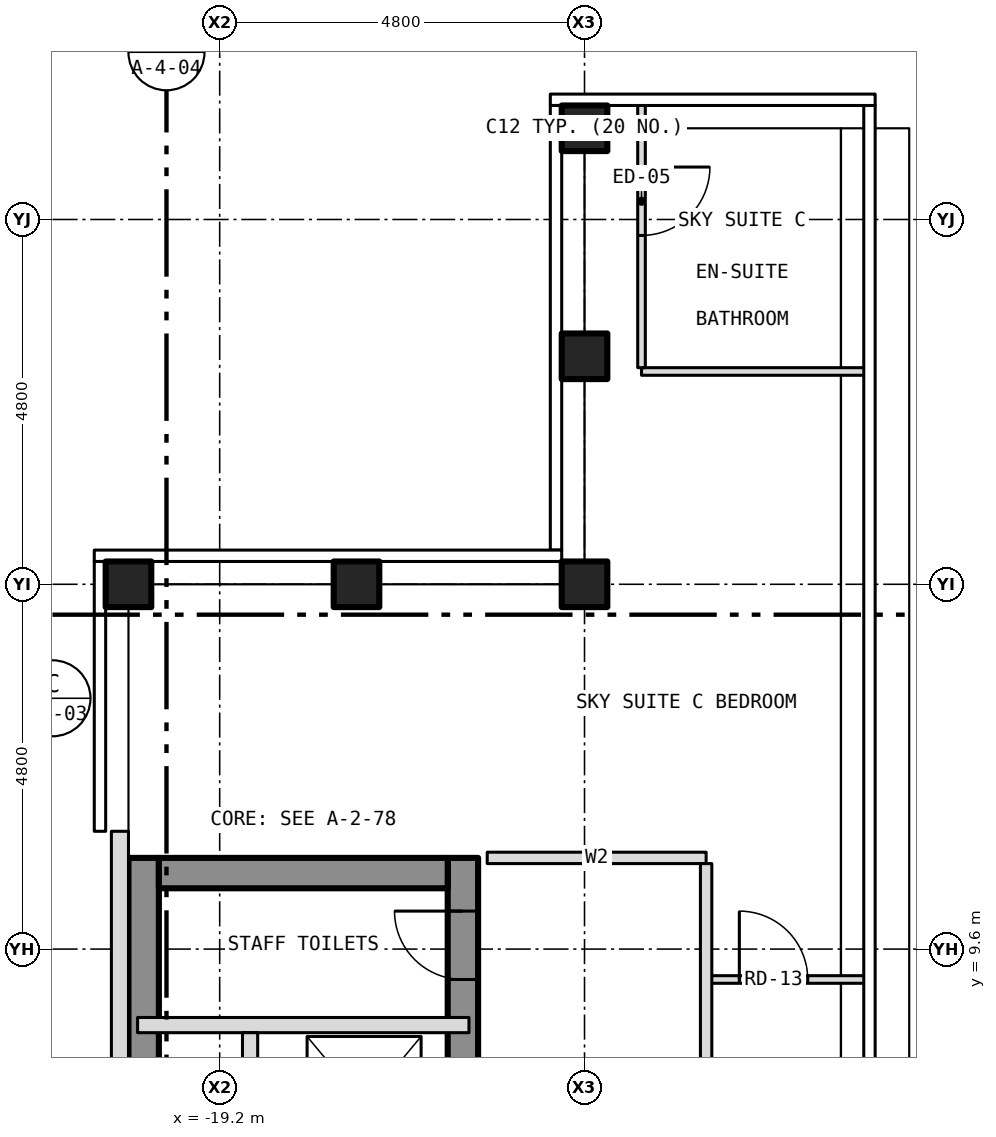
"""IFC4 building model, lengths in metres.
Left out: names, types, materials, properties, quantities, classifications, styles, units other than length and angle.
Written with IfcOpenShell. Run it as: python <this file> out.ifc"""

import sys

from ifc_helpers import new_model, si_unit, direction, frame, frame_2d, origin, origin_2d, place, context, subcontext, project, spatial, rectangle, hollow_rectangle, extrude, element, fill, save


model = new_model("IFC4")
c1 = context("Model", 3, precision=1e-05, world=origin(), true_north=direction((0.0, 1.0)))
c2 = subcontext(c1, "Body", "Model", "MODEL_VIEW")
j1 = project(units=[si_unit("LENGTHUNIT", "METRE"), si_unit("PLANEANGLEUNIT", "RADIAN")], contexts=[c1])
p1 = place(None, origin())
s1 = spatial("IfcSite", under=j1, at=p1, CompositionType="ELEMENT")
p2 = place(p1, origin())
s2 = spatial("IfcBuilding", under=s1, at=p2, CompositionType="ELEMENT")
p3 = place(p2, frame((0.0, 0.0, 283.0)))
s3 = spatial("IfcBuildingStorey", under=s2, at=p3, CompositionType="ELEMENT", Elevation=283.0)
for number, where, z_axis, x_axis in (
    (1, (-14.4, 20.4, -0.15), (0.0, 0.0, 1.0), (1.0, 0.0, 0.0)),
    (2, (-20.4, 14.4, -0.15), (0.0, 0.0, 1.0), (1.0, 0.0, 0.0)),
    (3, (-14.4, 14.4, -0.15), (0.0, 0.0, 1.0), (1.0, 0.0, 0.0)),
    (4, (-14.4, 17.4, -0.15), (0.0, 0.0, 1.0), (1.0, 0.0, 0.0)),
    (5, (-17.4, 14.4, -0.15), (0.0, 0.0, 1.0), (1.0, 0.0, 0.0)),
):
    element("IfcColumn", number, at=place(p3, frame(where, z_axis=z_axis, x_axis=x_axis)), inside=s3, PredefinedType="COLUMN", context=c2, shape_type="SweptSolid", body=[
        extrude(hollow_rectangle(XDim=0.6, YDim=0.6, WallThickness=0.03, at=origin_2d()), origin(), (0.0, 0.0, 1.0), 3.5),
    ])
p4 = place(p3, frame((-16.0, -10.8, 0.0), z_axis=(0.0, 0.0, 1.0), x_axis=(0.0, 1.0, 0.0)))
e6 = element("IfcWall", 6, at=p4, inside=s3, PredefinedType="SHEAR", context=c2, shape_type="SweptSolid", body=[
    extrude(rectangle(XDim=21.6, YDim=0.4, at=frame_2d((10.8, 0.0))), origin(), (0.0, 0.0, 1.0), 3.25),
])
p5 = place(p4, frame((9.4, 0.0, 0.0)))
e7 = element("IfcOpeningElement", 7, at=p5, cuts=e6, PredefinedType="OPENING", context=c2, shape_type="SweptSolid", body=[
    extrude(rectangle(XDim=1.1, YDim=2.1, at=frame_2d((0.55, 1.05))), frame((0.0, 0.212, 0.0), z_axis=(0.0, -1.0, 0.0), x_axis=(1.0, 0.0, 0.0)), (0.0, 0.0, 1.0), 0.424),
])
p6 = place(p4, frame((11.5, 0.0, 0.0)))
e8 = element("IfcOpeningElement", 8, at=p6, cuts=e6, PredefinedType="OPENING", context=c2, shape_type="SweptSolid", body=[
    extrude(rectangle(XDim=1.1, YDim=2.1, at=frame_2d((0.55, 1.05))), frame((0.0, 0.212, 0.0), z_axis=(0.0, -1.0, 0.0), x_axis=(1.0, 0.0, 0.0)), (0.0, 0.0, 1.0), 0.424),
])
p7 = place(p4, frame((13.6, 0.0, 0.0)))
e9 = element("IfcOpeningElement", 9, at=p7, cuts=e6, PredefinedType="OPENING", context=c2, shape_type="SweptSolid", body=[
    extrude(rectangle(XDim=1.1, YDim=2.1, at=frame_2d((0.55, 1.05))), frame((0.0, 0.212, 0.0), z_axis=(0.0, -1.0, 0.0), x_axis=(1.0, 0.0, 0.0)), (0.0, 0.0, 1.0), 0.424),
])
p8 = place(p4, frame((15.7, 0.0, 0.0)))
e10 = element("IfcOpeningElement", 10, at=p8, cuts=e6, PredefinedType="OPENING", context=c2, shape_type="SweptSolid", body=[
    extrude(rectangle(XDim=1.1, YDim=2.1, at=frame_2d((0.55, 1.05))), frame((0.0, 0.212, 0.0), z_axis=(0.0, -1.0, 0.0), x_axis=(1.0, 0.0, 0.0)), (0.0, 0.0, 1.0), 0.424),
])
p9 = place(p4, frame((17.8, 0.0, 0.0)))
e11 = element("IfcOpeningElement", 11, at=p9, cuts=e6, PredefinedType="OPENING", context=c2, shape_type="SweptSolid", body=[
    extrude(rectangle(XDim=1.1, YDim=2.1, at=frame_2d((0.55, 1.05))), frame((0.0, 0.212, 0.0), z_axis=(0.0, -1.0, 0.0), x_axis=(1.0, 0.0, 0.0)), (0.0, 0.0, 1.0), 0.424),
])
p10 = place(p4, frame((0.458, 0.0, 0.0)))
e12 = element("IfcOpeningElement", 12, at=p10, cuts=e6, PredefinedType="OPENING", context=c2, shape_type="SweptSolid", body=[
    extrude(rectangle(XDim=1.1, YDim=2.1, at=frame_2d((0.55, 1.05))), frame((0.0, 0.212, 0.0), z_axis=(0.0, -1.0, 0.0), x_axis=(1.0, 0.0, 0.0)), (0.0, 0.0, 1.0), 0.424),
])
p11 = place(p4, frame((7.5, 0.0, 0.0)))
e13 = element("IfcOpeningElement", 13, at=p11, cuts=e6, PredefinedType="OPENING", context=c2, shape_type="SweptSolid", body=[
    extrude(rectangle(XDim=1.1, YDim=2.1, at=frame_2d((0.55, 1.05))), frame((0.0, 0.212, 0.0), z_axis=(0.0, -1.0, 0.0), x_axis=(1.0, 0.0, 0.0)), (0.0, 0.0, 1.0), 0.424),
])
p12 = place(p4, frame((20.0, 0.0, 0.0)))
e14 = element("IfcOpeningElement", 14, at=p12, cuts=e6, PredefinedType="OPENING", context=c2, shape_type="SweptSolid", body=[
    extrude(rectangle(XDim=0.9, YDim=2.1, at=frame_2d((0.45, 1.05))), frame((0.0, 0.212, 0.0), z_axis=(0.0, -1.0, 0.0), x_axis=(1.0, 0.0, 0.0)), (0.0, 0.0, 1.0), 0.424),
])
p13 = place(p3, frame((-20.2, -10.8, 0.0), z_axis=(0.0, 0.0, 1.0), x_axis=(0.0, 1.0, 0.0)))
e15 = element("IfcWall", 15, at=p13, inside=s3, PredefinedType="SHEAR", context=c2, shape_type="SweptSolid", body=[
    extrude(rectangle(XDim=21.6, YDim=0.4, at=frame_2d((10.8, 0.0))), origin(), (0.0, 0.0, 1.0), 3.25),
])
p14 = place(p3, frame((-20.0, 10.6, 0.0), z_axis=(0.0, 0.0, 1.0), x_axis=(1.0, 0.0, 0.0)))
e16 = element("IfcWall", 16, at=p14, inside=s3, PredefinedType="SHEAR", context=c2, shape_type="SweptSolid", body=[
    extrude(rectangle(XDim=3.8, YDim=0.4, at=frame_2d((1.9, 0.0))), origin(), (0.0, 0.0, 1.0), 3.25),
])
p15 = place(p3, frame((-20.512, 11.15, 0.0), z_axis=(0.0, 0.0, 1.0), x_axis=(0.0, -1.0, 0.0)))
e17 = element("IfcWall", 17, at=p15, inside=s3, PredefinedType="SOLIDWALL", context=c2, shape_type="SweptSolid", body=[
    extrude(rectangle(XDim=22.3, YDim=0.225, at=frame_2d((11.15, 0.0))), origin(), (0.0, 0.0, 1.0), 3.5),
])
p16 = place(p15, frame((18.4, 0.0, 1.0)))
e18 = element("IfcOpeningElement", 18, at=p16, cuts=e17, PredefinedType="OPENING", context=c2, shape_type="SweptSolid", body=[
    extrude(rectangle(XDim=0.6, YDim=1.5, at=frame_2d((0.3, 0.75))), frame((0.0, 0.125, 0.0), z_axis=(0.0, -1.0, 0.0), x_axis=(1.0, 0.0, 0.0)), (0.0, 0.0, 1.0), 0.249),
])
p17 = place(p3, frame((-20.28, 8.6, 0.0), z_axis=(0.0, 0.0, 1.0), x_axis=(1.0, 0.0, 0.0)))
e19 = element("IfcWall", 19, at=p17, inside=s3, PredefinedType="PARTITIONING", context=c2, shape_type="SweptSolid", body=[
    extrude(rectangle(XDim=4.36, YDim=0.2, at=frame_2d((2.18, 0.0))), origin(), (0.0, 0.0, 1.0), 3.25),
])
p18 = place(p3, frame((-12.8, 9.2, 0.0), z_axis=(0.0, 0.0, 1.0), x_axis=(1.0, 0.0, 0.0)))
e20 = element("IfcWall", 20, at=p18, inside=s3, PredefinedType="PARTITIONING", context=c2, shape_type="SweptSolid", body=[
    extrude(rectangle(XDim=2.104, YDim=0.1, at=frame_2d((1.052, 0.0))), origin(), (0.0, 0.0, 1.0), 3.35),
])
p19 = place(p18, frame((0.437, 0.0, 0.0)))
e21 = element("IfcOpeningElement", 21, at=p19, cuts=e20, PredefinedType="OPENING", context=c2, shape_type="SweptSolid", body=[
    extrude(rectangle(XDim=0.9, YDim=2.1, at=frame_2d((0.45, 1.05))), frame((0.0, 0.062, 0.0), z_axis=(0.0, -1.0, 0.0), x_axis=(1.0, 0.0, 0.0)), (0.0, 0.0, 1.0), 0.124),
])
p20 = place(p3, frame((-15.68, 10.8, 0.0), z_axis=(0.0, 0.0, 1.0), x_axis=(1.0, 0.0, 0.0)))
e22 = element("IfcWall", 22, at=p20, inside=s3, PredefinedType="PARTITIONING", context=c2, shape_type="SweptSolid", body=[
    extrude(rectangle(XDim=2.88, YDim=0.15, at=frame_2d((1.44, 0.0))), origin(), (0.0, 0.0, 1.0), 3.35),
])
p21 = place(p3, frame((-13.65, 17.2, 0.0), z_axis=(0.0, 0.0, 1.0), x_axis=(1.0, 0.0, 0.0)))
e23 = element("IfcWall", 23, at=p21, inside=s3, PredefinedType="PARTITIONING", context=c2, shape_type="SweptSolid", body=[
    extrude(rectangle(XDim=2.954, YDim=0.1, at=frame_2d((1.477, 0.0))), origin(), (0.0, 0.0, 1.0), 3.35),
])
p22 = place(p3, frame((-18.8, -1.8, 0.0), z_axis=(0.0, 0.0, 1.0), x_axis=(0.0, 1.0, 0.0)))
e24 = element("IfcWall", 24, at=p22, inside=s3, PredefinedType="PARTITIONING", context=c2, shape_type="SweptSolid", body=[
    extrude(rectangle(XDim=10.3, YDim=0.2, at=frame_2d((5.15, 0.0))), origin(), (0.0, 0.0, 1.0), 3.25),
])
p23 = place(p3, frame((-13.65, 17.25, 0.0), z_axis=(0.0, 0.0, 1.0), x_axis=(0.0, 1.0, 0.0)))
e25 = element("IfcWall", 25, at=p23, inside=s3, PredefinedType="PARTITIONING", context=c2, shape_type="SweptSolid", body=[
    extrude(rectangle(XDim=3.48, YDim=0.1, at=frame_2d((1.74, 0.0))), origin(), (0.0, 0.0, 1.0), 3.35),
])
p24 = place(p23, frame((1.74, 0.0, 0.0)))
e26 = element("IfcOpeningElement", 26, at=p24, cuts=e25, PredefinedType="OPENING", context=c2, shape_type="SweptSolid", body=[
    extrude(rectangle(XDim=0.9, YDim=2.1, at=frame_2d((0.45, 1.05))), frame((0.0, 0.062, 0.0), z_axis=(0.0, -1.0, 0.0), x_axis=(1.0, 0.0, 0.0)), (0.0, 0.0, 1.0), 0.124),
])
p25 = place(p3, frame((-12.8, 2.4, 0.0), z_axis=(0.0, 0.0, 1.0), x_axis=(0.0, 1.0, 0.0)))
e27 = element("IfcWall", 27, at=p25, inside=s3, PredefinedType="PARTITIONING", context=c2, shape_type="SweptSolid", body=[
    extrude(rectangle(XDim=8.325, YDim=0.15, at=frame_2d((4.163, 0.0))), origin(), (0.0, 0.0, 1.0), 3.35),
])
p26 = place(p25, frame((2.89, 0.0, 0.0)))
e28 = element("IfcOpeningElement", 28, at=p26, cuts=e27, PredefinedType="OPENING", context=c2, shape_type="SweptSolid", body=[
    extrude(rectangle(XDim=0.9, YDim=2.1, at=frame_2d((0.45, 1.05))), frame((0.0, 0.087, 0.0), z_axis=(0.0, -1.0, 0.0), x_axis=(1.0, 0.0, 0.0)), (0.0, 0.0, 1.0), 0.174),
])
p27 = place(p12, origin())
e29 = element("IfcDoor", 29, at=p27, inside=s3, OperationType="SINGLE_SWING_RIGHT", PredefinedType="DOOR", context=c2, shape_type="SweptSolid", body=[
    extrude(rectangle(XDim=0.9, YDim=2.1, at=frame_2d((0.45, 1.05))), frame((0.0, 0.025, 0.0), z_axis=(0.0, -1.0, 0.0), x_axis=(1.0, 0.0, 0.0)), (0.0, 0.0, 1.0), 0.05),
])
fill(e14, e29)
p28 = place(p19, origin())
e30 = element("IfcDoor", 30, at=p28, inside=s3, OperationType="SINGLE_SWING_LEFT", PredefinedType="DOOR", context=c2, shape_type="SweptSolid", body=[
    extrude(rectangle(XDim=0.9, YDim=2.1, at=frame_2d((0.45, 1.05))), frame((0.0, 0.025, 0.0), z_axis=(0.0, -1.0, 0.0), x_axis=(1.0, 0.0, 0.0)), (0.0, 0.0, 1.0), 0.05),
])
fill(e21, e30)
p29 = place(p24, origin())
e31 = element("IfcDoor", 31, at=p29, inside=s3, OperationType="SINGLE_SWING_RIGHT", PredefinedType="DOOR", context=c2, shape_type="SweptSolid", body=[
    extrude(rectangle(XDim=0.9, YDim=2.1, at=frame_2d((0.45, 1.05))), frame((0.0, 0.025, 0.0), z_axis=(0.0, -1.0, 0.0), x_axis=(1.0, 0.0, 0.0)), (0.0, 0.0, 1.0), 0.05),
])
fill(e26, e31)
save(model, sys.argv[1])
